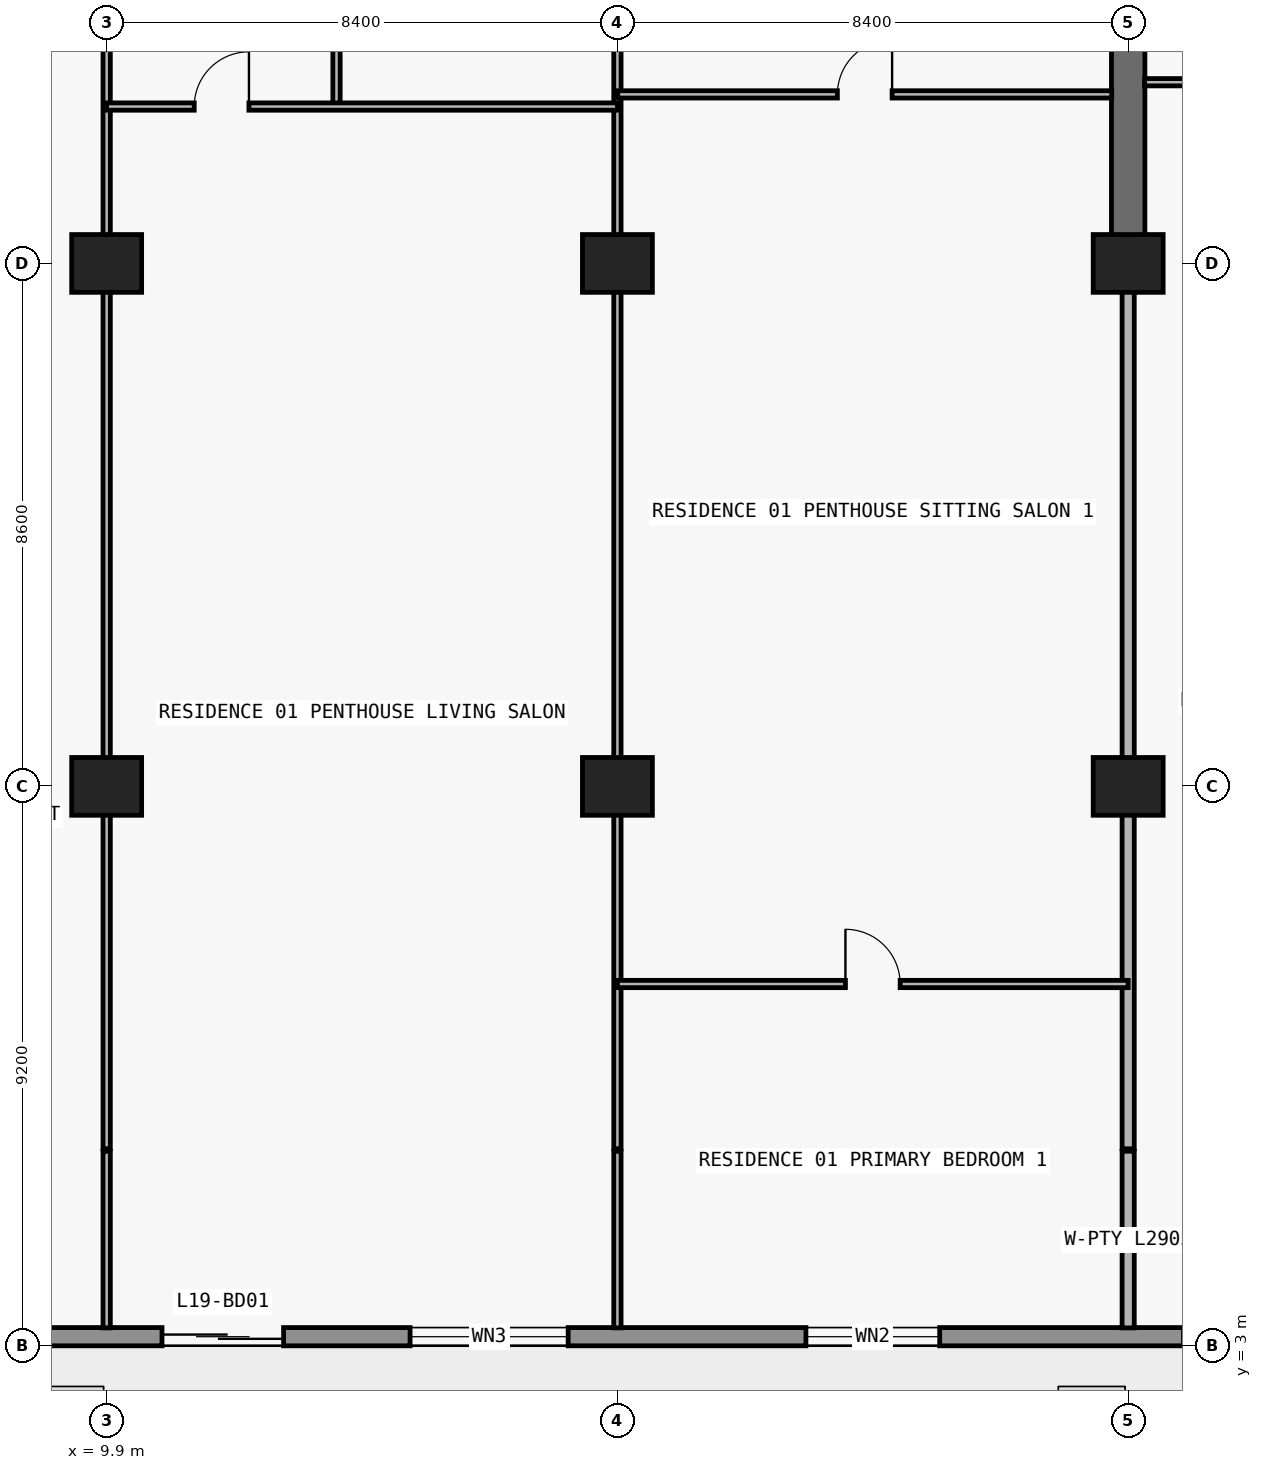
"""IFC4 building model, lengths in metres.
Left out: names, types, materials, properties, quantities, classifications, styles, units other than length and angle.
Written with IfcOpenShell. Run it as: python <this file> out.ifc"""

import sys

from ifc_helpers import new_model, si_unit, direction, frame, frame_2d, origin, origin_2d, place, context, subcontext, project, spatial, rectangle, extrude, element, fill, save


model = new_model("IFC4")
c1 = context("Model", 3, precision=1e-05, world=origin(), true_north=direction((0.0, 1.0)))
c2 = subcontext(c1, "Body", "Model", "MODEL_VIEW")
j1 = project(units=[si_unit("LENGTHUNIT", "METRE"), si_unit("PLANEANGLEUNIT", "RADIAN")], contexts=[c1])
p1 = place(None, origin())
s1 = spatial("IfcSite", under=j1, at=p1, CompositionType="ELEMENT")
p2 = place(p1, origin())
s2 = spatial("IfcBuilding", under=s1, at=p2, CompositionType="ELEMENT")
p3 = place(p2, frame((0.0, 0.0, 72.9)))
s3 = spatial("IfcBuildingStorey", under=s2, at=p3, CompositionType="ELEMENT", Elevation=72.9)
for number, where, z_axis, x_axis in (
    (1, (9.9, 12.2, 0.0), (0.0, 0.0, 1.0), (1.0, 0.0, 0.0)),
    (2, (18.3, 12.2, 0.0), (0.0, 0.0, 1.0), (1.0, 0.0, 0.0)),
    (3, (26.7, 12.2, 0.0), (0.0, 0.0, 1.0), (1.0, 0.0, 0.0)),
    (4, (9.9, 20.8, 0.0), (0.0, 0.0, 1.0), (1.0, 0.0, 0.0)),
    (5, (18.3, 20.8, 0.0), (0.0, 0.0, 1.0), (1.0, 0.0, 0.0)),
    (6, (26.7, 20.8, 0.0), (0.0, 0.0, 1.0), (1.0, 0.0, 0.0)),
):
    element("IfcColumn", number, at=place(p3, frame(where, z_axis=z_axis, x_axis=x_axis)), inside=s3, PredefinedType="COLUMN", context=c2, shape_type="SweptSolid", body=[
        extrude(rectangle(XDim=1.15, YDim=0.95, at=origin_2d()), origin(), (0.0, 0.0, 1.0), 3.05),
    ])
p4 = place(p3, frame((26.7, 20.8, 0.0), z_axis=(0.0, 0.0, 1.0), x_axis=(0.0, 1.0, 0.0)))
e7 = element("IfcWall", 7, at=p4, inside=s3, PredefinedType="SHEAR", context=c2, shape_type="SweptSolid", body=[
    extrude(rectangle(XDim=8.6, YDim=0.55, at=frame_2d((4.3, 0.0))), origin(), (0.0, 0.0, 1.0), 3.05),
])
p5 = place(p3, frame((72.7, 3.15, 0.0), z_axis=(0.0, 0.0, 1.0), x_axis=(-1.0, 0.0, 0.0)))
e8 = element("IfcWall", 8, at=p5, inside=s3, PredefinedType="STANDARD", context=c2, shape_type="SweptSolid", body=[
    extrude(rectangle(XDim=67.6, YDim=0.3, at=frame_2d((33.8, 0.0))), origin(), (0.0, 0.0, 1.0), 3.05),
])
p6 = place(p5, frame((59.89, 0.0, 0.0)))
e9 = element("IfcOpeningElement", 9, at=p6, cuts=e8, PredefinedType="OPENING", context=c2, shape_type="SweptSolid", body=[
    extrude(rectangle(XDim=2.0, YDim=2.3, at=frame_2d((1.0, 1.15))), frame((0.0, 0.16, 0.0), z_axis=(0.0, -1.0, 0.0), x_axis=(1.0, 0.0, 0.0)), (0.0, 0.0, 1.0), 0.32),
])
p7 = place(p5, frame((55.21, 0.0, 0.65)))
e10 = element("IfcOpeningElement", 10, at=p7, cuts=e8, PredefinedType="OPENING", context=c2, shape_type="SweptSolid", body=[
    extrude(rectangle(XDim=2.6, YDim=1.85, at=frame_2d((1.3, 0.925))), frame((0.0, 0.16, 0.0), z_axis=(0.0, -1.0, 0.0), x_axis=(1.0, 0.0, 0.0)), (0.0, 0.0, 1.0), 0.32),
])
p8 = place(p5, frame((49.1, 0.0, 0.85)))
e11 = element("IfcOpeningElement", 11, at=p8, cuts=e8, PredefinedType="OPENING", context=c2, shape_type="SweptSolid", body=[
    extrude(rectangle(XDim=2.2, YDim=1.55, at=frame_2d((1.1, 0.775))), frame((0.0, 0.16, 0.0), z_axis=(0.0, -1.0, 0.0), x_axis=(1.0, 0.0, 0.0)), (0.0, 0.0, 1.0), 0.32),
])
p9 = place(p5, frame((43.09, 0.0, 0.0)))
e12 = element("IfcOpeningElement", 12, at=p9, cuts=e8, PredefinedType="OPENING", context=c2, shape_type="SweptSolid", body=[
    extrude(rectangle(XDim=2.0, YDim=2.3, at=frame_2d((1.0, 1.15))), frame((0.0, 0.16, 0.0), z_axis=(0.0, -1.0, 0.0), x_axis=(1.0, 0.0, 0.0)), (0.0, 0.0, 1.0), 0.32),
])
p10 = place(p5, frame((38.41, 0.0, 0.65)))
e13 = element("IfcOpeningElement", 13, at=p10, cuts=e8, PredefinedType="OPENING", context=c2, shape_type="SweptSolid", body=[
    extrude(rectangle(XDim=2.6, YDim=1.85, at=frame_2d((1.3, 0.925))), frame((0.0, 0.16, 0.0), z_axis=(0.0, -1.0, 0.0), x_axis=(1.0, 0.0, 0.0)), (0.0, 0.0, 1.0), 0.32),
])
p11 = place(p5, frame((32.7, 0.0, 0.85)))
e14 = element("IfcOpeningElement", 14, at=p11, cuts=e8, PredefinedType="OPENING", context=c2, shape_type="SweptSolid", body=[
    extrude(rectangle(XDim=2.2, YDim=1.55, at=frame_2d((1.1, 0.775))), frame((0.0, 0.16, 0.0), z_axis=(0.0, -1.0, 0.0), x_axis=(1.0, 0.0, 0.0)), (0.0, 0.0, 1.0), 0.32),
])
p12 = place(p5, frame((24.7, 0.0, 0.85)))
e15 = element("IfcOpeningElement", 15, at=p12, cuts=e8, PredefinedType="OPENING", context=c2, shape_type="SweptSolid", body=[
    extrude(rectangle(XDim=2.2, YDim=1.55, at=frame_2d((1.1, 0.775))), frame((0.0, 0.16, 0.0), z_axis=(0.0, -1.0, 0.0), x_axis=(1.0, 0.0, 0.0)), (0.0, 0.0, 1.0), 0.32),
])
p13 = place(p5, frame((18.69, 0.0, 0.0)))
e16 = element("IfcOpeningElement", 16, at=p13, cuts=e8, PredefinedType="OPENING", context=c2, shape_type="SweptSolid", body=[
    extrude(rectangle(XDim=2.0, YDim=2.3, at=frame_2d((1.0, 1.15))), frame((0.0, 0.16, 0.0), z_axis=(0.0, -1.0, 0.0), x_axis=(1.0, 0.0, 0.0)), (0.0, 0.0, 1.0), 0.32),
])
p14 = place(p5, frame((14.01, 0.0, 0.65)))
e17 = element("IfcOpeningElement", 17, at=p14, cuts=e8, PredefinedType="OPENING", context=c2, shape_type="SweptSolid", body=[
    extrude(rectangle(XDim=2.6, YDim=1.85, at=frame_2d((1.3, 0.925))), frame((0.0, 0.16, 0.0), z_axis=(0.0, -1.0, 0.0), x_axis=(1.0, 0.0, 0.0)), (0.0, 0.0, 1.0), 0.32),
])
p15 = place(p5, frame((7.9, 0.0, 0.85)))
e18 = element("IfcOpeningElement", 18, at=p15, cuts=e8, PredefinedType="OPENING", context=c2, shape_type="SweptSolid", body=[
    extrude(rectangle(XDim=2.2, YDim=1.55, at=frame_2d((1.1, 0.775))), frame((0.0, 0.16, 0.0), z_axis=(0.0, -1.0, 0.0), x_axis=(1.0, 0.0, 0.0)), (0.0, 0.0, 1.0), 0.32),
])
p16 = place(p3, frame((9.9, 3.295, 0.0), z_axis=(0.0, 0.0, 1.0), x_axis=(0.0, 1.0, 0.0)))
e19 = element("IfcWall", 19, at=p16, inside=s3, PredefinedType="PARTITIONING", context=c2, shape_type="SweptSolid", body=[
    extrude(rectangle(XDim=2.905, YDim=0.12, at=frame_2d((1.453, 0.0))), origin(), (0.0, 0.0, 1.0), 3.05),
])
p17 = place(p3, frame((9.9, 6.24, 0.0), z_axis=(0.0, 0.0, 1.0), x_axis=(0.0, 1.0, 0.0)))
e20 = element("IfcWall", 20, at=p17, inside=s3, PredefinedType="PARTITIONING", context=c2, shape_type="SweptSolid", body=[
    extrude(rectangle(XDim=27.96, YDim=0.12, at=frame_2d((13.98, 0.0))), origin(), (0.0, 0.0, 1.0), 2.11),
])
p18 = place(p17, frame((19.09, 0.0, 0.0)))
e21 = element("IfcOpeningElement", 21, at=p18, cuts=e20, PredefinedType="OPENING", context=c2, shape_type="SweptSolid", body=[
    extrude(rectangle(XDim=0.9, YDim=2.06, at=frame_2d((0.45, 1.03))), frame((0.0, 0.07, 0.0), z_axis=(0.0, -1.0, 0.0), x_axis=(1.0, 0.0, 0.0)), (0.0, 0.0, 1.0), 0.14),
])
p19 = place(p3, frame((13.68, 23.38, 0.0), z_axis=(0.0, 0.0, 1.0), x_axis=(0.0, 1.0, 0.0)))
e22 = element("IfcWall", 22, at=p19, inside=s3, PredefinedType="PARTITIONING", context=c2, shape_type="SweptSolid", body=[
    extrude(rectangle(XDim=4.8, YDim=0.12, at=frame_2d((2.4, 0.0))), origin(), (0.0, 0.0, 1.0), 3.05),
])
p20 = place(p19, frame((1.95, 0.0, 0.0)))
e23 = element("IfcOpeningElement", 23, at=p20, cuts=e22, PredefinedType="OPENING", context=c2, shape_type="SweptSolid", body=[
    extrude(rectangle(XDim=0.9, YDim=2.15, at=frame_2d((0.45, 1.075))), frame((0.0, 0.07, 0.0), z_axis=(0.0, -1.0, 0.0), x_axis=(1.0, 0.0, 0.0)), (0.0, 0.0, 1.0), 0.14),
])
p21 = place(p3, frame((18.3, 3.295, 0.0), z_axis=(0.0, 0.0, 1.0), x_axis=(0.0, 1.0, 0.0)))
e24 = element("IfcWall", 24, at=p21, inside=s3, PredefinedType="PARTITIONING", context=c2, shape_type="SweptSolid", body=[
    extrude(rectangle(XDim=2.905, YDim=0.12, at=frame_2d((1.453, 0.0))), origin(), (0.0, 0.0, 1.0), 3.05),
])
p22 = place(p3, frame((18.3, 6.24, 0.0), z_axis=(0.0, 0.0, 1.0), x_axis=(0.0, 1.0, 0.0)))
e25 = element("IfcWall", 25, at=p22, inside=s3, PredefinedType="PARTITIONING", context=c2, shape_type="SweptSolid", body=[
    extrude(rectangle(XDim=27.96, YDim=0.12, at=frame_2d((13.98, 0.0))), origin(), (0.0, 0.0, 1.0), 2.11),
])
p23 = place(p22, frame((19.09, 0.0, 0.0)))
e26 = element("IfcOpeningElement", 26, at=p23, cuts=e25, PredefinedType="OPENING", context=c2, shape_type="SweptSolid", body=[
    extrude(rectangle(XDim=0.9, YDim=2.06, at=frame_2d((0.45, 1.03))), frame((0.0, 0.07, 0.0), z_axis=(0.0, -1.0, 0.0), x_axis=(1.0, 0.0, 0.0)), (0.0, 0.0, 1.0), 0.14),
])
p24 = place(p3, frame((26.7, 3.295, 0.0), z_axis=(0.0, 0.0, 1.0), x_axis=(0.0, 1.0, 0.0)))
e27 = element("IfcWall", 27, at=p24, inside=s3, PredefinedType="PARTITIONING", context=c2, shape_type="SweptSolid", body=[
    extrude(rectangle(XDim=2.905, YDim=0.2, at=frame_2d((1.453, 0.0))), origin(), (0.0, 0.0, 1.0), 3.05),
])
p25 = place(p3, frame((26.7, 6.24, 0.0), z_axis=(0.0, 0.0, 1.0), x_axis=(0.0, 1.0, 0.0)))
e28 = element("IfcWall", 28, at=p25, inside=s3, PredefinedType="PARTITIONING", context=c2, shape_type="SweptSolid", body=[
    extrude(rectangle(XDim=14.555, YDim=0.2, at=frame_2d((7.277, 0.0))), origin(), (0.0, 0.0, 1.0), 2.11),
])
p26 = place(p3, frame((18.3, 8.95, 0.0), z_axis=(0.0, 0.0, 1.0), x_axis=(1.0, 0.0, 0.0)))
e29 = element("IfcWall", 29, at=p26, inside=s3, PredefinedType="PARTITIONING", context=c2, shape_type="SweptSolid", body=[
    extrude(rectangle(XDim=8.4, YDim=0.12, at=frame_2d((4.2, 0.0))), origin(), (0.0, 0.0, 1.0), 3.05),
])
p27 = place(p26, frame((3.75, 0.0, 0.0)))
e30 = element("IfcOpeningElement", 30, at=p27, cuts=e29, PredefinedType="OPENING", context=c2, shape_type="SweptSolid", body=[
    extrude(rectangle(XDim=0.9, YDim=2.15, at=frame_2d((0.45, 1.075))), frame((0.0, 0.07, 0.0), z_axis=(0.0, -1.0, 0.0), x_axis=(1.0, 0.0, 0.0)), (0.0, 0.0, 1.0), 0.14),
])
p28 = place(p3, frame((9.9, 23.38, 0.0), z_axis=(0.0, 0.0, 1.0), x_axis=(1.0, 0.0, 0.0)))
e31 = element("IfcWall", 31, at=p28, inside=s3, PredefinedType="PARTITIONING", context=c2, shape_type="SweptSolid", body=[
    extrude(rectangle(XDim=8.4, YDim=0.12, at=frame_2d((4.2, 0.0))), origin(), (0.0, 0.0, 1.0), 3.05),
])
p29 = place(p28, frame((1.44, 0.0, 0.0)))
e32 = element("IfcOpeningElement", 32, at=p29, cuts=e31, PredefinedType="OPENING", context=c2, shape_type="SweptSolid", body=[
    extrude(rectangle(XDim=0.9, YDim=2.15, at=frame_2d((0.45, 1.075))), frame((0.0, 0.07, 0.0), z_axis=(0.0, -1.0, 0.0), x_axis=(1.0, 0.0, 0.0)), (0.0, 0.0, 1.0), 0.14),
])
p30 = place(p3, frame((18.305, 23.58, 0.0), z_axis=(0.0, 0.0, 1.0), x_axis=(1.0, 0.0, 0.0)))
e33 = element("IfcWall", 33, at=p30, inside=s3, PredefinedType="PARTITIONING", context=c2, shape_type="SweptSolid", body=[
    extrude(rectangle(XDim=8.125, YDim=0.12, at=frame_2d((4.062, 0.0))), origin(), (0.0, 0.0, 1.0), 3.05),
])
p31 = place(p30, frame((3.613, 0.0, 0.0)))
e34 = element("IfcOpeningElement", 34, at=p31, cuts=e33, PredefinedType="OPENING", context=c2, shape_type="SweptSolid", body=[
    extrude(rectangle(XDim=0.9, YDim=2.15, at=frame_2d((0.45, 1.075))), frame((0.0, 0.07, 0.0), z_axis=(0.0, -1.0, 0.0), x_axis=(1.0, 0.0, 0.0)), (0.0, 0.0, 1.0), 0.14),
])
p32 = place(p3, frame((26.97, 23.78, 0.0), z_axis=(0.0, 0.0, 1.0), x_axis=(1.0, 0.0, 0.0)))
e35 = element("IfcWall", 35, at=p32, inside=s3, PredefinedType="PARTITIONING", context=c2, shape_type="SweptSolid", body=[
    extrude(rectangle(XDim=8.13, YDim=0.12, at=frame_2d((4.065, 0.0))), origin(), (0.0, 0.0, 1.0), 3.05),
])
p33 = place(p32, frame((1.179, 0.0, 0.0)))
e36 = element("IfcOpeningElement", 36, at=p33, cuts=e35, PredefinedType="OPENING", context=c2, shape_type="SweptSolid", body=[
    extrude(rectangle(XDim=0.9, YDim=2.15, at=frame_2d((0.45, 1.075))), frame((0.0, 0.07, 0.0), z_axis=(0.0, -1.0, 0.0), x_axis=(1.0, 0.0, 0.0)), (0.0, 0.0, 1.0), 0.14),
])
p34 = place(p6, origin())
e37 = element("IfcDoor", 37, at=p34, inside=s3, OperationType="DOUBLE_DOOR_SLIDING", PredefinedType="DOOR", context=c2, shape_type="SweptSolid", body=[
    extrude(rectangle(XDim=2.0, YDim=2.3, at=frame_2d((1.0, 1.15))), frame((0.0, 0.025, 0.0), z_axis=(0.0, -1.0, 0.0), x_axis=(1.0, 0.0, 0.0)), (0.0, 0.0, 1.0), 0.05),
])
fill(e9, e37)
p35 = place(p7, origin())
e38 = element("IfcWindow", 38, at=p35, inside=s3, PartitioningType="SINGLE_PANEL", PredefinedType="WINDOW", context=c2, shape_type="SweptSolid", body=[
    extrude(rectangle(XDim=2.6, YDim=1.85, at=frame_2d((1.3, 0.925))), frame((0.0, 0.03, 0.0), z_axis=(0.0, -1.0, 0.0), x_axis=(1.0, 0.0, 0.0)), (0.0, 0.0, 1.0), 0.06),
])
fill(e10, e38)
p36 = place(p8, origin())
e39 = element("IfcWindow", 39, at=p36, inside=s3, PartitioningType="SINGLE_PANEL", PredefinedType="WINDOW", context=c2, shape_type="SweptSolid", body=[
    extrude(rectangle(XDim=2.2, YDim=1.55, at=frame_2d((1.1, 0.775))), frame((0.0, 0.03, 0.0), z_axis=(0.0, -1.0, 0.0), x_axis=(1.0, 0.0, 0.0)), (0.0, 0.0, 1.0), 0.06),
])
fill(e11, e39)
p37 = place(p29, origin())
e40 = element("IfcDoor", 40, at=p37, inside=s3, OperationType="SINGLE_SWING_RIGHT", PredefinedType="DOOR", context=c2, shape_type="SweptSolid", body=[
    extrude(rectangle(XDim=0.9, YDim=2.15, at=frame_2d((0.45, 1.075))), frame((0.0, 0.025, 0.0), z_axis=(0.0, -1.0, 0.0), x_axis=(1.0, 0.0, 0.0)), (0.0, 0.0, 1.0), 0.05),
])
fill(e32, e40)
p38 = place(p31, origin())
e41 = element("IfcDoor", 41, at=p38, inside=s3, OperationType="SINGLE_SWING_RIGHT", PredefinedType="DOOR", context=c2, shape_type="SweptSolid", body=[
    extrude(rectangle(XDim=0.9, YDim=2.15, at=frame_2d((0.45, 1.075))), frame((0.0, 0.025, 0.0), z_axis=(0.0, -1.0, 0.0), x_axis=(1.0, 0.0, 0.0)), (0.0, 0.0, 1.0), 0.05),
])
fill(e34, e41)
p39 = place(p27, origin())
e42 = element("IfcDoor", 42, at=p39, inside=s3, OperationType="SINGLE_SWING_LEFT", PredefinedType="DOOR", context=c2, shape_type="SweptSolid", body=[
    extrude(rectangle(XDim=0.9, YDim=2.15, at=frame_2d((0.45, 1.075))), frame((0.0, 0.025, 0.0), z_axis=(0.0, -1.0, 0.0), x_axis=(1.0, 0.0, 0.0)), (0.0, 0.0, 1.0), 0.05),
])
fill(e30, e42)
save(model, sys.argv[1])
